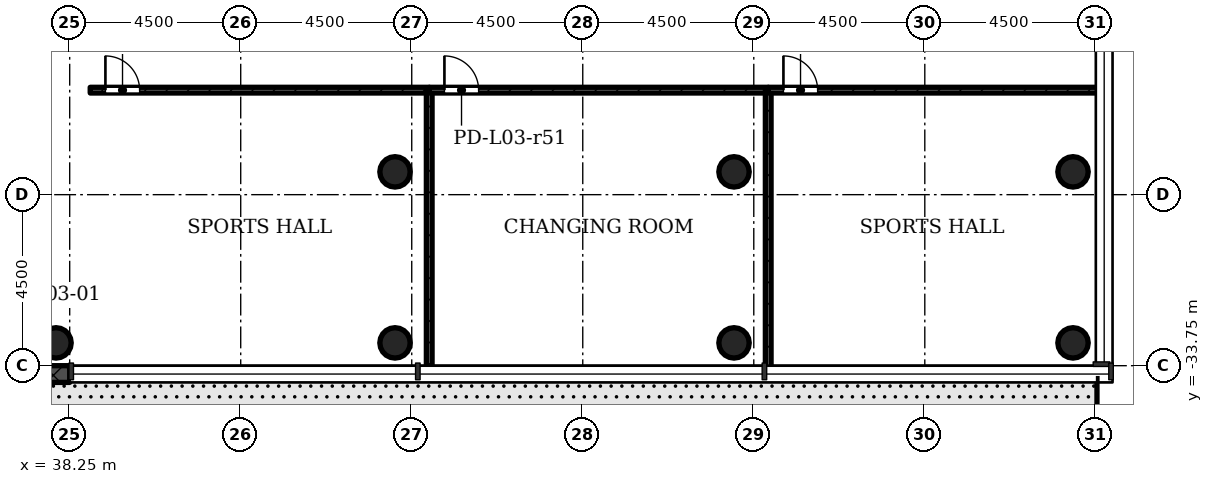
"""IFC4 building model, lengths in metres.
Left out: names, types, materials, properties, quantities, classifications, styles, units other than length and angle.
Written with IfcOpenShell. Run it as: python <this file> out.ifc"""

import sys

from ifc_helpers import new_model, si_unit, direction, frame, frame_2d, origin, origin_2d, place, context, subcontext, project, spatial, rectangle, hollow_circle, extrude, element, fill, save


model = new_model("IFC4")
c1 = context("Model", 3, precision=1e-05, world=origin(), true_north=direction((0.0, 1.0)))
c2 = subcontext(c1, "Body", "Model", "MODEL_VIEW")
j1 = project(units=[si_unit("LENGTHUNIT", "METRE"), si_unit("PLANEANGLEUNIT", "RADIAN")], contexts=[c1])
p1 = place(None, origin())
s1 = spatial("IfcSite", under=j1, at=p1, CompositionType="ELEMENT")
p2 = place(p1, origin())
s2 = spatial("IfcBuilding", under=s1, at=p2, CompositionType="ELEMENT")
p3 = place(p2, frame((0.0, 0.0, 15.5)))
s3 = spatial("IfcBuildingStorey", under=s2, at=p3, CompositionType="ELEMENT", Elevation=15.5)
for number, where, z_axis, x_axis in (
    (1, (37.89, -33.15, 0.0), (0.0, 0.0, 1.0), (1.0, 0.0, 0.0)),
    (2, (46.81, -33.15, 0.0), (0.0, 0.0, 1.0), (1.0, 0.0, 0.0)),
    (3, (55.73, -33.15, 0.0), (0.0, 0.0, 1.0), (1.0, 0.0, 0.0)),
    (4, (64.65, -33.15, 0.0), (0.0, 0.0, 1.0), (1.0, 0.0, 0.0)),
):
    element("IfcColumn", number, at=place(p3, frame(where, z_axis=z_axis, x_axis=x_axis)), inside=s3, PredefinedType="COLUMN", context=c2, shape_type="SweptSolid", body=[
        extrude(hollow_circle(Radius=0.4, WallThickness=0.028, at=origin_2d()), origin(), (0.0, 0.0, 1.0), 4.08),
    ])
for number, where, z_axis, x_axis in (
    (5, (46.81, -28.65, 0.0), (0.0, 0.0, 1.0), (1.0, 0.0, 0.0)),
    (6, (55.73, -28.65, 0.0), (0.0, 0.0, 1.0), (1.0, 0.0, 0.0)),
    (7, (64.65, -28.65, 0.0), (0.0, 0.0, 1.0), (1.0, 0.0, 0.0)),
):
    element("IfcColumn", number, at=place(p3, frame(where, z_axis=z_axis, x_axis=x_axis)), inside=s3, PredefinedType="COLUMN", context=c2, shape_type="SweptSolid", body=[
        extrude(hollow_circle(Radius=0.4, WallThickness=0.028, at=origin_2d()), origin(), (0.0, 0.0, 1.0), 4.5),
    ])
p4 = place(p3, frame((33.75, -33.97, -0.02), z_axis=(0.0, 0.0, 1.0), x_axis=(1.0, 0.0, 0.0)))
e8 = element("IfcWall", 8, at=p4, inside=s3, PredefinedType="STANDARD", context=c2, shape_type="SweptSolid", body=[
    extrude(rectangle(XDim=4.5, YDim=0.44, at=frame_2d((2.25, 0.0))), origin(), (0.0, 0.0, 1.0), 4.22),
])
p5 = place(p4, frame((1.35, 0.0, 0.02)))
e9 = element("IfcOpeningElement", 9, at=p5, cuts=e8, PredefinedType="OPENING", context=c2, shape_type="SweptSolid", body=[
    extrude(rectangle(XDim=1.8, YDim=2.1, at=frame_2d((0.9, 1.05))), frame((0.0, 0.23, 0.0), z_axis=(0.0, -1.0, 0.0), x_axis=(1.0, 0.0, 0.0)), (0.0, 0.0, 1.0), 0.46),
])
p6 = place(p3, frame((38.79, -26.5, 0.0), z_axis=(0.0, 0.0, 1.0), x_axis=(1.0, 0.0, 0.0)))
e10 = element("IfcWall", 10, at=p6, inside=s3, PredefinedType="PARTITIONING", context=c2, shape_type="SweptSolid", body=[
    extrude(rectangle(XDim=8.92, YDim=0.15, at=frame_2d((4.46, 0.0))), origin(), (0.0, 0.0, 1.0), 4.08),
])
p7 = place(p6, frame((0.4, 0.0, 0.0)))
e11 = element("IfcOpeningElement", 11, at=p7, cuts=e10, PredefinedType="OPENING", context=c2, shape_type="SweptSolid", body=[
    extrude(rectangle(XDim=0.9, YDim=2.1, at=frame_2d((0.45, 1.05))), frame((0.0, 0.085, 0.0), z_axis=(0.0, -1.0, 0.0), x_axis=(1.0, 0.0, 0.0)), (0.0, 0.0, 1.0), 0.17),
])
p8 = place(p3, frame((47.71, -26.5, 0.0), z_axis=(0.0, 0.0, 1.0), x_axis=(0.0, -1.0, 0.0)))
e12 = element("IfcWall", 12, at=p8, inside=s3, PredefinedType="PARTITIONING", context=c2, shape_type="SweptSolid", body=[
    extrude(rectangle(XDim=7.35, YDim=0.15, at=frame_2d((3.675, 0.0))), origin(), (0.0, 0.0, 1.0), 4.08),
])
p9 = place(p3, frame((47.71, -26.5, 0.0), z_axis=(0.0, 0.0, 1.0), x_axis=(1.0, 0.0, 0.0)))
e13 = element("IfcWall", 13, at=p9, inside=s3, PredefinedType="PARTITIONING", context=c2, shape_type="SweptSolid", body=[
    extrude(rectangle(XDim=8.92, YDim=0.15, at=frame_2d((4.46, 0.0))), origin(), (0.0, 0.0, 1.0), 4.08),
])
p10 = place(p9, frame((0.4, 0.0, 0.0)))
e14 = element("IfcOpeningElement", 14, at=p10, cuts=e13, PredefinedType="OPENING", context=c2, shape_type="SweptSolid", body=[
    extrude(rectangle(XDim=0.9, YDim=2.1, at=frame_2d((0.45, 1.05))), frame((0.0, 0.085, 0.0), z_axis=(0.0, -1.0, 0.0), x_axis=(1.0, 0.0, 0.0)), (0.0, 0.0, 1.0), 0.17),
])
p11 = place(p3, frame((56.63, -26.5, 0.0), z_axis=(0.0, 0.0, 1.0), x_axis=(0.0, -1.0, 0.0)))
e15 = element("IfcWall", 15, at=p11, inside=s3, PredefinedType="PARTITIONING", context=c2, shape_type="SweptSolid", body=[
    extrude(rectangle(XDim=7.35, YDim=0.15, at=frame_2d((3.675, 0.0))), origin(), (0.0, 0.0, 1.0), 4.08),
])
p12 = place(p3, frame((56.63, -26.5, 0.0), z_axis=(0.0, 0.0, 1.0), x_axis=(1.0, 0.0, 0.0)))
e16 = element("IfcWall", 16, at=p12, inside=s3, PredefinedType="PARTITIONING", context=c2, shape_type="SweptSolid", body=[
    extrude(rectangle(XDim=8.72, YDim=0.15, at=frame_2d((4.36, 0.0))), origin(), (0.0, 0.0, 1.0), 4.08),
])
p13 = place(p12, frame((0.4, 0.0, 0.0)))
e17 = element("IfcOpeningElement", 17, at=p13, cuts=e16, PredefinedType="OPENING", context=c2, shape_type="SweptSolid", body=[
    extrude(rectangle(XDim=0.9, YDim=2.1, at=frame_2d((0.45, 1.05))), frame((0.0, 0.085, 0.0), z_axis=(0.0, -1.0, 0.0), x_axis=(1.0, 0.0, 0.0)), (0.0, 0.0, 1.0), 0.17),
])
p14 = place(p7, origin())
e18 = element("IfcDoor", 18, at=p14, inside=s3, OperationType="SINGLE_SWING_RIGHT", PredefinedType="DOOR", context=c2, shape_type="SweptSolid", body=[
    extrude(rectangle(XDim=0.9, YDim=2.1, at=frame_2d((0.45, 1.05))), frame((0.0, 0.025, 0.0), z_axis=(0.0, -1.0, 0.0), x_axis=(1.0, 0.0, 0.0)), (0.0, 0.0, 1.0), 0.05),
])
fill(e11, e18)
p15 = place(p10, origin())
e19 = element("IfcDoor", 19, at=p15, inside=s3, OperationType="SINGLE_SWING_RIGHT", PredefinedType="DOOR", context=c2, shape_type="SweptSolid", body=[
    extrude(rectangle(XDim=0.9, YDim=2.1, at=frame_2d((0.45, 1.05))), frame((0.0, 0.025, 0.0), z_axis=(0.0, -1.0, 0.0), x_axis=(1.0, 0.0, 0.0)), (0.0, 0.0, 1.0), 0.05),
])
fill(e14, e19)
p16 = place(p13, origin())
e20 = element("IfcDoor", 20, at=p16, inside=s3, OperationType="SINGLE_SWING_RIGHT", PredefinedType="DOOR", context=c2, shape_type="SweptSolid", body=[
    extrude(rectangle(XDim=0.9, YDim=2.1, at=frame_2d((0.45, 1.05))), frame((0.0, 0.025, 0.0), z_axis=(0.0, -1.0, 0.0), x_axis=(1.0, 0.0, 0.0)), (0.0, 0.0, 1.0), 0.05),
])
fill(e17, e20)
save(model, sys.argv[1])
